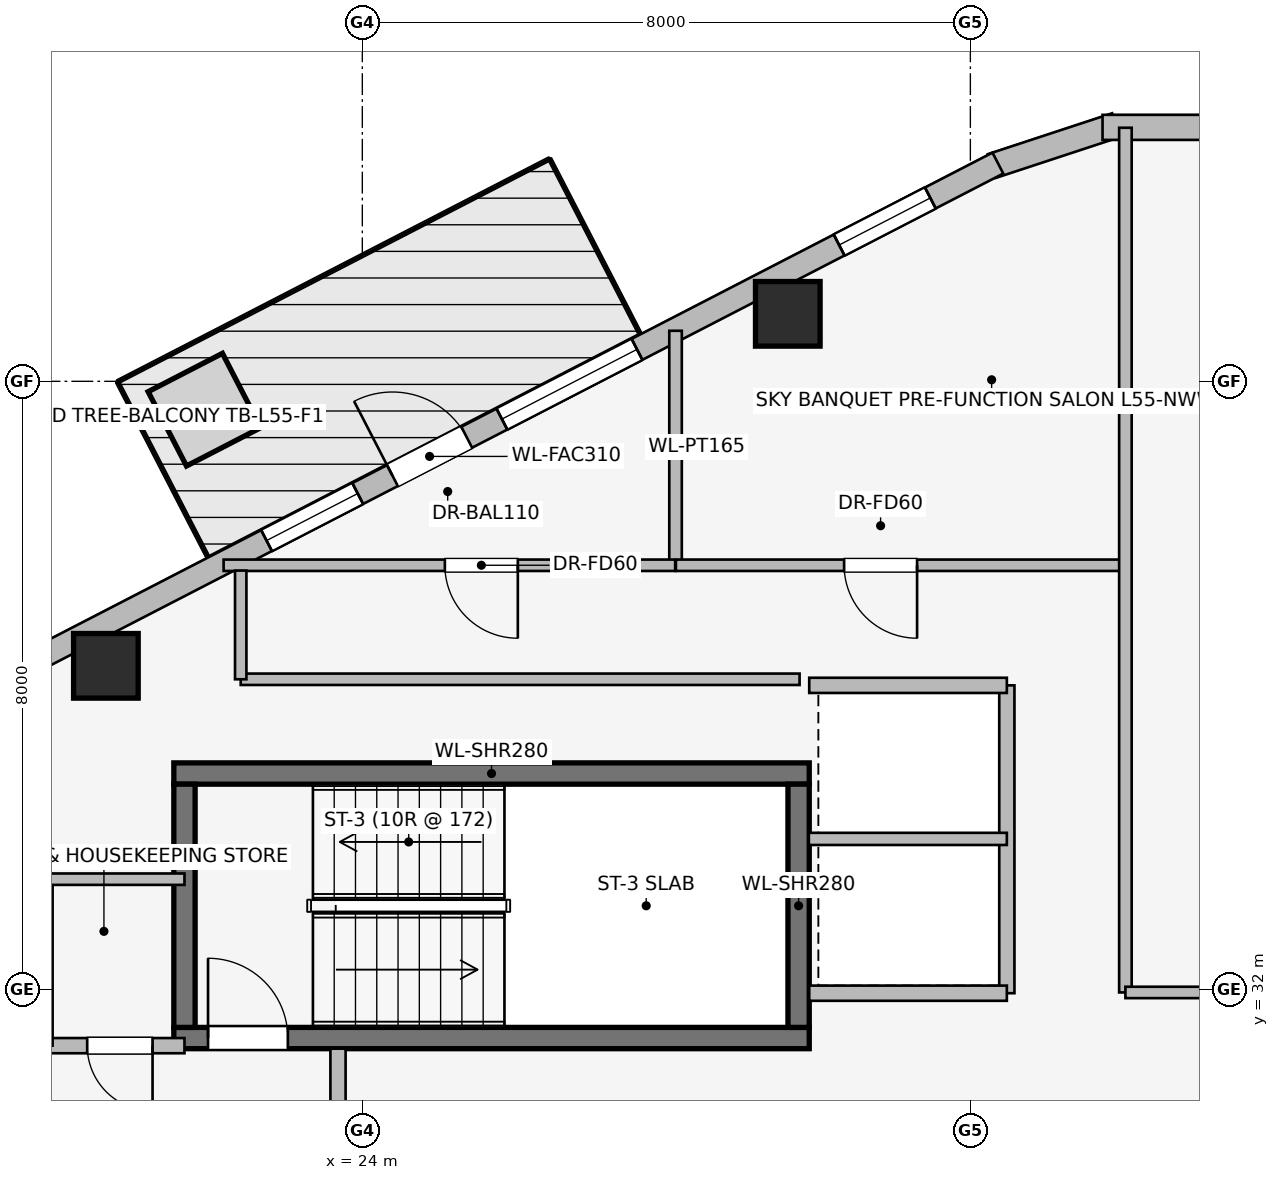
"""IFC4 building model, lengths in metres.
Left out: names, types, materials, properties, quantities, classifications, styles, units other than length and angle.
Written with IfcOpenShell. Run it as: python <this file> out.ifc"""

import sys

from ifc_helpers import new_model, si_unit, direction, frame, frame_2d, origin, origin_2d, place, context, subcontext, project, spatial, rectangle, extrude, element, fill, save


model = new_model("IFC4")
c1 = context("Model", 3, precision=1e-05, world=origin(), true_north=direction((0.0, 1.0)))
c2 = subcontext(c1, "Body", "Model", "MODEL_VIEW")
j1 = project(units=[si_unit("LENGTHUNIT", "METRE"), si_unit("PLANEANGLEUNIT", "RADIAN")], contexts=[c1])
p1 = place(None, origin())
s1 = spatial("IfcSite", under=j1, at=p1, CompositionType="ELEMENT")
p2 = place(p1, origin())
s2 = spatial("IfcBuilding", under=s1, at=p2, CompositionType="ELEMENT")
p3 = place(p2, frame((0.0, 0.0, 203.35)))
s3 = spatial("IfcBuildingStorey", under=s2, at=p3, CompositionType="ELEMENT", Elevation=203.35)
p4 = place(p3, frame((21.52, 31.36, 0.0), z_axis=(0.0, 0.0, 1.0), x_axis=(1.0, 0.0, 0.0)))
e1 = element("IfcWall", 1, at=p4, inside=s3, PredefinedType="SHEAR", context=c2, shape_type="SweptSolid", body=[
    extrude(rectangle(XDim=8.36, YDim=0.28, at=frame_2d((4.18, 0.0))), origin(), (0.0, 0.0, 1.0), 3.45),
])
p5 = place(p4, frame((0.45, 0.0, 0.0)))
e2 = element("IfcOpeningElement", 2, at=p5, cuts=e1, PredefinedType="OPENING", context=c2, shape_type="SweptSolid", body=[
    extrude(rectangle(XDim=1.05, YDim=2.0, at=frame_2d((0.525, 1.0))), frame((0.0, 0.15, 0.0), z_axis=(0.0, -1.0, 0.0), x_axis=(1.0, 0.0, 0.0)), (0.0, 0.0, 1.0), 0.3),
])
p6 = place(p3, frame((29.88, 34.84, 0.0), z_axis=(0.0, 0.0, 1.0), x_axis=(-1.0, 0.0, 0.0)))
e3 = element("IfcWall", 3, at=p6, inside=s3, PredefinedType="SHEAR", context=c2, shape_type="SweptSolid", body=[
    extrude(rectangle(XDim=8.36, YDim=0.28, at=frame_2d((4.18, 0.0))), origin(), (0.0, 0.0, 1.0), 3.45),
])
for number, where, z_axis, x_axis in (
    (4, (21.66, 34.7, 0.0), (0.0, 0.0, 1.0), (0.0, -1.0, 0.0)),
    (5, (29.74, 31.5, 0.0), (0.0, 0.0, 1.0), (0.0, 1.0, 0.0)),
):
    element("IfcWall", number, at=place(p3, frame(where, z_axis=z_axis, x_axis=x_axis)), inside=s3, PredefinedType="SHEAR", context=c2, shape_type="SweptSolid", body=[
        extrude(rectangle(XDim=3.2, YDim=0.28, at=frame_2d((1.6, 0.0))), origin(), (0.0, 0.0, 1.0), 3.45),
    ])
for number, where, z_axis, x_axis in (
    (6, (29.598, 40.888, 0.0), (0.0, 0.0, 1.0), (1.0, 0.0, 0.0)),
    (7, (20.626, 36.257, 0.0), (0.0, 0.0, 1.0), (1.0, 0.0, 0.0)),
):
    element("IfcColumn", number, at=place(p3, frame(where, z_axis=z_axis, x_axis=x_axis)), inside=s3, PredefinedType="COLUMN", context=c2, shape_type="SweptSolid", body=[
        extrude(rectangle(XDim=0.85, YDim=0.85, at=origin_2d()), origin(), (0.0, 0.0, 1.0), 3.45),
    ])
p7 = place(p3, frame((32.281, 42.832, 0.0), z_axis=(0.0, 0.0, 1.0), x_axis=(0.949937416267, 0.312440242569, 0.0)))
e8 = element("IfcWall", 8, at=p7, inside=s3, PredefinedType="STANDARD", context=c2, shape_type="SweptSolid", body=[
    extrude(rectangle(XDim=1.722, YDim=0.33, at=frame_2d((0.861, 0.0))), origin(), (0.0, 0.0, 1.0), 3.19),
])
p8 = place(p3, frame((33.739, 43.341, 0.0), z_axis=(0.0, 0.0, 1.0), x_axis=(1.0, 0.0, 0.0)))
e9 = element("IfcWall", 9, at=p8, inside=s3, PredefinedType="STANDARD", context=c2, shape_type="SweptSolid", body=[
    extrude(rectangle(XDim=1.722, YDim=0.33, at=frame_2d((0.861, 0.0))), origin(), (0.0, 0.0, 1.0), 3.19),
])
p9 = place(p3, frame((17.408, 35.153, 0.0), z_axis=(0.0, 0.0, 1.0), x_axis=(0.888626188278, 0.458632202867, 0.0)))
e10 = element("IfcWall", 10, at=p9, inside=s3, PredefinedType="STANDARD", context=c2, shape_type="SweptSolid", body=[
    extrude(rectangle(XDim=16.828, YDim=0.31, at=frame_2d((8.414, 0.0))), origin(), (0.0, 0.0, 1.0), 3.19),
])
p10 = place(p9, frame((7.864, 0.0, 0.0)))
e11 = element("IfcOpeningElement", 11, at=p10, cuts=e10, PredefinedType="OPENING", context=c2, shape_type="SweptSolid", body=[
    extrude(rectangle(XDim=1.1, YDim=2.04, at=frame_2d((0.55, 1.02))), frame((0.0, 0.165, 0.0), z_axis=(0.0, -1.0, 0.0), x_axis=(1.0, 0.0, 0.0)), (0.0, 0.0, 1.0), 0.33),
])
p11 = place(p9, frame((0.675, 0.0, 0.75)))
e12 = element("IfcOpeningElement", 12, at=p11, cuts=e10, PredefinedType="OPENING", context=c2, shape_type="SweptSolid", body=[
    extrude(rectangle(XDim=2.0, YDim=1.5, at=frame_2d((1.0, 0.75))), frame((0.0, 0.165, 0.0), z_axis=(0.0, -1.0, 0.0), x_axis=(1.0, 0.0, 0.0)), (0.0, 0.0, 1.0), 0.33),
])
p12 = place(p9, frame((6.0, 0.0, 0.75)))
e13 = element("IfcOpeningElement", 13, at=p12, cuts=e10, PredefinedType="OPENING", context=c2, shape_type="SweptSolid", body=[
    extrude(rectangle(XDim=1.35, YDim=1.45, at=frame_2d((0.675, 0.725))), frame((0.0, 0.165, 0.0), z_axis=(0.0, -1.0, 0.0), x_axis=(1.0, 0.0, 0.0)), (0.0, 0.0, 1.0), 0.33),
])
p13 = place(p9, frame((9.485, 0.0, 0.75)))
e14 = element("IfcOpeningElement", 14, at=p13, cuts=e10, PredefinedType="OPENING", context=c2, shape_type="SweptSolid", body=[
    extrude(rectangle(XDim=2.0, YDim=1.5, at=frame_2d((1.0, 0.75))), frame((0.0, 0.165, 0.0), z_axis=(0.0, -1.0, 0.0), x_axis=(1.0, 0.0, 0.0)), (0.0, 0.0, 1.0), 0.33),
])
p14 = place(p9, frame((14.478, 0.0, 0.75)))
e15 = element("IfcOpeningElement", 15, at=p14, cuts=e10, PredefinedType="OPENING", context=c2, shape_type="SweptSolid", body=[
    extrude(rectangle(XDim=1.35, YDim=1.45, at=frame_2d((0.675, 0.725))), frame((0.0, 0.165, 0.0), z_axis=(0.0, -1.0, 0.0), x_axis=(1.0, 0.0, 0.0)), (0.0, 0.0, 1.0), 0.33),
])
p15 = place(p3, frame((23.68, 25.68, 0.0), z_axis=(0.0, 0.0, 1.0), x_axis=(0.0, 1.0, 0.0)))
e16 = element("IfcWall", 16, at=p15, inside=s3, PredefinedType="PARTITIONING", context=c2, shape_type="SweptSolid", body=[
    extrude(rectangle(XDim=5.54, YDim=0.2, at=frame_2d((2.77, 0.0))), origin(), (0.0, 0.0, 1.0), 3.19),
])
p16 = place(p15, frame((1.8, 0.0, 0.0)))
e17 = element("IfcOpeningElement", 17, at=p16, cuts=e16, PredefinedType="OPENING", context=c2, shape_type="SweptSolid", body=[
    extrude(rectangle(XDim=1.05, YDim=2.0, at=frame_2d((0.525, 1.0))), frame((0.0, 0.11, 0.0), z_axis=(0.0, -1.0, 0.0), x_axis=(1.0, 0.0, 0.0)), (0.0, 0.0, 1.0), 0.22),
])
p17 = place(p3, frame((21.66, 31.26, 0.0), z_axis=(0.0, 0.0, 1.0), x_axis=(-1.0, 0.0, 0.0)))
e18 = element("IfcWall", 18, at=p17, inside=s3, PredefinedType="PARTITIONING", context=c2, shape_type="SweptSolid", body=[
    extrude(rectangle(XDim=2.01, YDim=0.2, at=frame_2d((1.005, 0.0))), origin(), (0.0, 0.0, 1.0), 3.19),
])
p18 = place(p17, frame((0.42, 0.0, 0.0)))
e19 = element("IfcOpeningElement", 19, at=p18, cuts=e18, PredefinedType="OPENING", context=c2, shape_type="SweptSolid", body=[
    extrude(rectangle(XDim=0.86, YDim=2.0, at=frame_2d((0.43, 1.0))), frame((0.0, 0.11, 0.0), z_axis=(0.0, -1.0, 0.0), x_axis=(1.0, 0.0, 0.0)), (0.0, 0.0, 1.0), 0.22),
])
p19 = place(p3, frame((32.48, 31.95, 0.0), z_axis=(0.0, 0.0, 1.0), x_axis=(0.0, 1.0, 0.0)))
e20 = element("IfcWall", 20, at=p19, inside=s3, PredefinedType="PARTITIONING", context=c2, shape_type="SweptSolid", body=[
    extrude(rectangle(XDim=4.05, YDim=0.2, at=frame_2d((2.025, 0.0))), origin(), (0.0, 0.0, 1.0), 3.19),
])
for number, where, z_axis, x_axis in (
    (21, (29.88, 36.0, 0.0), (0.0, 0.0, 1.0), (1.0, 0.0, 0.0)),
    (22, (32.48, 31.95, 0.0), (0.0, 0.0, 1.0), (-1.0, 0.0, 0.0)),
):
    element("IfcWall", number, at=place(p3, frame(where, z_axis=z_axis, x_axis=x_axis)), inside=s3, PredefinedType="PARTITIONING", context=c2, shape_type="SweptSolid", body=[
        extrude(rectangle(XDim=2.6, YDim=0.2, at=frame_2d((1.3, 0.0))), origin(), (0.0, 0.0, 1.0), 3.19),
    ])
p20 = place(p3, frame((29.875, 33.98, 0.0), z_axis=(0.0, 0.0, 1.0), x_axis=(1.0, 0.0, 0.0)))
e23 = element("IfcWall", 23, at=p20, inside=s3, PredefinedType="PARTITIONING", context=c2, shape_type="SweptSolid", body=[
    extrude(rectangle(XDim=2.605, YDim=0.16, at=frame_2d((1.302, 0.0))), origin(), (0.0, 0.0, 1.0), 2.582),
])
p21 = place(p3, frame((19.85, 33.45, 0.0), z_axis=(0.0, 0.0, 1.0), x_axis=(0.0, -1.0, 0.0)))
e24 = element("IfcWall", 24, at=p21, inside=s3, PredefinedType="PARTITIONING", context=c2, shape_type="SweptSolid", body=[
    extrude(rectangle(XDim=2.19, YDim=0.15, at=frame_2d((1.095, 0.0))), origin(), (0.0, 0.0, 1.0), 3.19),
])
p22 = place(p3, frame((21.66, 33.45, 0.0), z_axis=(0.0, 0.0, 1.0), x_axis=(-1.0, 0.0, 0.0)))
e25 = element("IfcWall", 25, at=p22, inside=s3, PredefinedType="PARTITIONING", context=c2, shape_type="SweptSolid", body=[
    extrude(rectangle(XDim=1.81, YDim=0.15, at=frame_2d((0.905, 0.0))), origin(), (0.0, 0.0, 1.0), 3.19),
])
p23 = place(p3, frame((28.121, 37.61, 0.0), z_axis=(0.0, 0.0, 1.0), x_axis=(0.0, 1.0, 0.0)))
e26 = element("IfcWall", 26, at=p23, inside=s3, PredefinedType="PARTITIONING", context=c2, shape_type="SweptSolid", body=[
    extrude(rectangle(XDim=3.055, YDim=0.165, at=frame_2d((1.527, 0.0))), origin(), (0.0, 0.0, 1.0), 3.19),
])
p24 = place(p3, frame((28.116, 37.58, 0.0), z_axis=(0.0, 0.0, 1.0), x_axis=(-1.0, 0.0, 0.0)))
e27 = element("IfcWall", 27, at=p24, inside=s3, PredefinedType="PARTITIONING", context=c2, shape_type="SweptSolid", body=[
    extrude(rectangle(XDim=5.941, YDim=0.15, at=frame_2d((2.97, 0.0))), origin(), (0.0, 0.0, 1.0), 3.19),
])
p25 = place(p24, frame((2.07, 0.0, 0.0)))
e28 = element("IfcOpeningElement", 28, at=p25, cuts=e27, PredefinedType="OPENING", context=c2, shape_type="SweptSolid", body=[
    extrude(rectangle(XDim=0.96, YDim=2.0, at=frame_2d((0.48, 1.0))), frame((0.0, 0.085, 0.0), z_axis=(0.0, -1.0, 0.0), x_axis=(1.0, 0.0, 0.0)), (0.0, 0.0, 1.0), 0.17),
])
p26 = place(p3, frame((33.962, 37.58, 0.0), z_axis=(0.0, 0.0, 1.0), x_axis=(-1.0, 0.0, 0.0)))
e29 = element("IfcWall", 29, at=p26, inside=s3, PredefinedType="PARTITIONING", context=c2, shape_type="SweptSolid", body=[
    extrude(rectangle(XDim=5.836, YDim=0.15, at=frame_2d((2.918, 0.0))), origin(), (0.0, 0.0, 1.0), 2.582),
])
p27 = place(p26, frame((2.663, 0.0, 0.0)))
e30 = element("IfcOpeningElement", 30, at=p27, cuts=e29, PredefinedType="OPENING", context=c2, shape_type="SweptSolid", body=[
    extrude(rectangle(XDim=0.96, YDim=2.0, at=frame_2d((0.48, 1.0))), frame((0.0, 0.085, 0.0), z_axis=(0.0, -1.0, 0.0), x_axis=(1.0, 0.0, 0.0)), (0.0, 0.0, 1.0), 0.17),
])
p28 = place(p3, frame((34.04, 31.96, 0.0), z_axis=(0.0, 0.0, 1.0), x_axis=(0.0, 1.0, 0.0)))
e31 = element("IfcWall", 31, at=p28, inside=s3, PredefinedType="PARTITIONING", context=c2, shape_type="SweptSolid", body=[
    extrude(rectangle(XDim=11.376, YDim=0.165, at=frame_2d((5.688, 0.0))), origin(), (0.0, 0.0, 1.0), 3.19),
])
p29 = place(p3, frame((41.46, 31.96, 0.0), z_axis=(0.0, 0.0, 1.0), x_axis=(-1.0, 0.0, 0.0)))
e32 = element("IfcWall", 32, at=p29, inside=s3, PredefinedType="PARTITIONING", context=c2, shape_type="SweptSolid", body=[
    extrude(rectangle(XDim=7.42, YDim=0.15, at=frame_2d((3.71, 0.0))), origin(), (0.0, 0.0, 1.0), 3.19),
])
p30 = place(p29, frame((3.23, 0.0, 0.0)))
e33 = element("IfcOpeningElement", 33, at=p30, cuts=e32, PredefinedType="OPENING", context=c2, shape_type="SweptSolid", body=[
    extrude(rectangle(XDim=0.96, YDim=2.0, at=frame_2d((0.48, 1.0))), frame((0.0, 0.085, 0.0), z_axis=(0.0, -1.0, 0.0), x_axis=(1.0, 0.0, 0.0)), (0.0, 0.0, 1.0), 0.17),
])
p31 = place(p3, frame((29.753, 36.08, 0.0), z_axis=(0.0, 0.0, 1.0), x_axis=(-1.0, 0.0, 0.0)))
e34 = element("IfcWall", 34, at=p31, inside=s3, PredefinedType="PARTITIONING", context=c2, shape_type="SweptSolid", body=[
    extrude(rectangle(XDim=7.353, YDim=0.15, at=frame_2d((3.677, 0.0))), origin(), (0.0, 0.0, 1.0), 3.19),
])
p32 = place(p3, frame((22.4, 36.08, 0.0), z_axis=(0.0, 0.0, 1.0), x_axis=(0.0, 1.0, 0.0)))
e35 = element("IfcWall", 35, at=p32, inside=s3, PredefinedType="PARTITIONING", context=c2, shape_type="SweptSolid", body=[
    extrude(rectangle(XDim=1.43, YDim=0.15, at=frame_2d((0.715, 0.0))), origin(), (0.0, 0.0, 1.0), 3.19),
])
p33 = place(p10, origin())
e36 = element("IfcDoor", 36, at=p33, inside=s3, OperationType="SINGLE_SWING_LEFT", PredefinedType="DOOR", context=c2, shape_type="SweptSolid", body=[
    extrude(rectangle(XDim=1.1, YDim=2.04, at=frame_2d((0.55, 1.02))), frame((0.0, 0.025, 0.0), z_axis=(0.0, -1.0, 0.0), x_axis=(1.0, 0.0, 0.0)), (0.0, 0.0, 1.0), 0.05),
])
fill(e11, e36)
p34 = place(p12, origin())
e37 = element("IfcWindow", 37, at=p34, inside=s3, PartitioningType="SINGLE_PANEL", PredefinedType="WINDOW", context=c2, shape_type="SweptSolid", body=[
    extrude(rectangle(XDim=1.35, YDim=1.45, at=frame_2d((0.675, 0.725))), frame((0.0, 0.03, 0.0), z_axis=(0.0, -1.0, 0.0), x_axis=(1.0, 0.0, 0.0)), (0.0, 0.0, 1.0), 0.06),
])
fill(e13, e37)
p35 = place(p13, origin())
e38 = element("IfcWindow", 38, at=p35, inside=s3, PartitioningType="SINGLE_PANEL", PredefinedType="WINDOW", context=c2, shape_type="SweptSolid", body=[
    extrude(rectangle(XDim=2.0, YDim=1.5, at=frame_2d((1.0, 0.75))), frame((0.0, 0.03, 0.0), z_axis=(0.0, -1.0, 0.0), x_axis=(1.0, 0.0, 0.0)), (0.0, 0.0, 1.0), 0.06),
])
fill(e14, e38)
p36 = place(p14, origin())
e39 = element("IfcWindow", 39, at=p36, inside=s3, PartitioningType="SINGLE_PANEL", PredefinedType="WINDOW", context=c2, shape_type="SweptSolid", body=[
    extrude(rectangle(XDim=1.35, YDim=1.45, at=frame_2d((0.675, 0.725))), frame((0.0, 0.03, 0.0), z_axis=(0.0, -1.0, 0.0), x_axis=(1.0, 0.0, 0.0)), (0.0, 0.0, 1.0), 0.06),
])
fill(e15, e39)
p37 = place(p5, origin())
e40 = element("IfcDoor", 40, at=p37, inside=s3, OperationType="SINGLE_SWING_LEFT", PredefinedType="DOOR", context=c2, shape_type="SweptSolid", body=[
    extrude(rectangle(XDim=1.05, YDim=2.0, at=frame_2d((0.525, 1.0))), frame((0.0, 0.025, 0.0), z_axis=(0.0, -1.0, 0.0), x_axis=(1.0, 0.0, 0.0)), (0.0, 0.0, 1.0), 0.05),
])
fill(e2, e40)
p38 = place(p18, origin())
e41 = element("IfcDoor", 41, at=p38, inside=s3, OperationType="SINGLE_SWING_LEFT", PredefinedType="DOOR", context=c2, shape_type="SweptSolid", body=[
    extrude(rectangle(XDim=0.86, YDim=2.0, at=frame_2d((0.43, 1.0))), frame((0.0, 0.025, 0.0), z_axis=(0.0, -1.0, 0.0), x_axis=(1.0, 0.0, 0.0)), (0.0, 0.0, 1.0), 0.05),
])
fill(e19, e41)
p39 = place(p25, origin())
e42 = element("IfcDoor", 42, at=p39, inside=s3, OperationType="SINGLE_SWING_LEFT", PredefinedType="DOOR", context=c2, shape_type="SweptSolid", body=[
    extrude(rectangle(XDim=0.96, YDim=2.0, at=frame_2d((0.48, 1.0))), frame((0.0, 0.025, 0.0), z_axis=(0.0, -1.0, 0.0), x_axis=(1.0, 0.0, 0.0)), (0.0, 0.0, 1.0), 0.05),
])
fill(e28, e42)
p40 = place(p27, origin())
e43 = element("IfcDoor", 43, at=p40, inside=s3, OperationType="SINGLE_SWING_LEFT", PredefinedType="DOOR", context=c2, shape_type="SweptSolid", body=[
    extrude(rectangle(XDim=0.96, YDim=2.0, at=frame_2d((0.48, 1.0))), frame((0.0, 0.025, 0.0), z_axis=(0.0, -1.0, 0.0), x_axis=(1.0, 0.0, 0.0)), (0.0, 0.0, 1.0), 0.05),
])
fill(e30, e43)
save(model, sys.argv[1])
